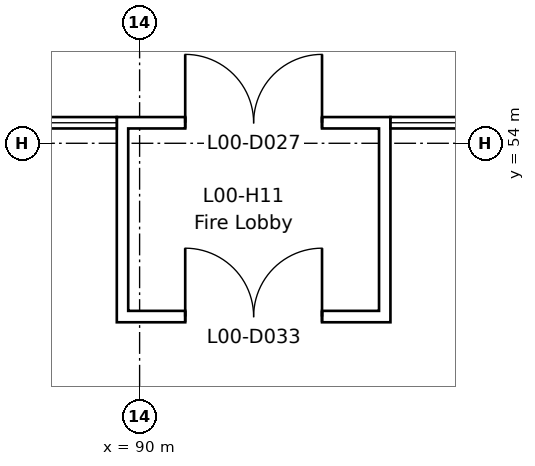
"""IFC4 building model, lengths in metres.
Left out: names, types, materials, properties, quantities, classifications, styles, units other than length and angle.
Written with IfcOpenShell. Run it as: python <this file> out.ifc"""

import sys

from ifc_helpers import new_model, si_unit, direction, frame, frame_2d, origin, place, context, subcontext, project, spatial, rectangle, extrude, element, fill, save


model = new_model("IFC4")
c1 = context("Model", 3, precision=1e-05, world=origin(), true_north=direction((0.0, 1.0)))
c2 = subcontext(c1, "Body", "Model", "MODEL_VIEW")
j1 = project(units=[si_unit("LENGTHUNIT", "METRE"), si_unit("PLANEANGLEUNIT", "RADIAN")], contexts=[c1])
p1 = place(None, origin())
s1 = spatial("IfcSite", under=j1, at=p1, CompositionType="ELEMENT")
p2 = place(p1, origin())
s2 = spatial("IfcBuilding", under=s1, at=p2, CompositionType="ELEMENT")
p3 = place(p2, origin())
s3 = spatial("IfcBuildingStorey", under=s2, at=p3, CompositionType="ELEMENT", Elevation=0.0)
p4 = place(p3, frame((89.7, 54.27, 0.0), z_axis=(0.0, 0.0, 1.0), x_axis=(1.0, 0.0, 0.0)))
e1 = element("IfcWall", 1, at=p4, inside=s3, PredefinedType="STANDARD", context=c2, shape_type="SweptSolid", body=[
    extrude(rectangle(XDim=3.6, YDim=0.15, at=frame_2d((1.8, 0.0))), origin(), (0.0, 0.0, 1.0), 4.8),
])
p5 = place(p4, frame((0.9, 0.0, 0.0)))
e2 = element("IfcOpeningElement", 2, at=p5, cuts=e1, PredefinedType="OPENING", context=c2, shape_type="SweptSolid", body=[
    extrude(rectangle(XDim=1.8, YDim=2.4, at=frame_2d((0.9, 1.2))), frame((0.0, 0.085, 0.0), z_axis=(0.0, -1.0, 0.0), x_axis=(1.0, 0.0, 0.0)), (0.0, 0.0, 1.0), 0.17),
])
for number, where, z_axis, x_axis in (
    (3, (89.775, 51.795, 0.0), (0.0, 0.0, 1.0), (0.0, 1.0, 0.0)),
    (4, (93.225, 51.795, 0.0), (0.0, 0.0, 1.0), (0.0, 1.0, 0.0)),
):
    element("IfcWall", number, at=place(p3, frame(where, z_axis=z_axis, x_axis=x_axis)), inside=s3, PredefinedType="STANDARD", context=c2, shape_type="SweptSolid", body=[
        extrude(rectangle(XDim=2.4, YDim=0.15, at=frame_2d((1.2, 0.0))), origin(), (0.0, 0.0, 1.0), 3.0),
    ])
p6 = place(p3, frame((89.7, 51.72, 0.0), z_axis=(0.0, 0.0, 1.0), x_axis=(1.0, 0.0, 0.0)))
e5 = element("IfcWall", 5, at=p6, inside=s3, PredefinedType="STANDARD", context=c2, shape_type="SweptSolid", body=[
    extrude(rectangle(XDim=3.6, YDim=0.15, at=frame_2d((1.8, 0.0))), origin(), (0.0, 0.0, 1.0), 3.0),
])
p7 = place(p6, frame((0.9, 0.0, 0.0)))
e6 = element("IfcOpeningElement", 6, at=p7, cuts=e5, PredefinedType="OPENING", context=c2, shape_type="SweptSolid", body=[
    extrude(rectangle(XDim=1.8, YDim=2.4, at=frame_2d((0.9, 1.2))), frame((0.0, 0.085, 0.0), z_axis=(0.0, -1.0, 0.0), x_axis=(1.0, 0.0, 0.0)), (0.0, 0.0, 1.0), 0.17),
])
p8 = place(p5, origin())
e7 = element("IfcDoor", 7, at=p8, inside=s3, OperationType="DOUBLE_DOOR_SINGLE_SWING", PredefinedType="DOOR", context=c2, shape_type="SweptSolid", body=[
    extrude(rectangle(XDim=1.8, YDim=2.4, at=frame_2d((0.9, 1.2))), frame((0.0, 0.025, 0.0), z_axis=(0.0, -1.0, 0.0), x_axis=(1.0, 0.0, 0.0)), (0.0, 0.0, 1.0), 0.05),
])
fill(e2, e7)
p9 = place(p7, origin())
e8 = element("IfcDoor", 8, at=p9, inside=s3, OperationType="DOUBLE_DOOR_SINGLE_SWING", PredefinedType="DOOR", context=c2, shape_type="SweptSolid", body=[
    extrude(rectangle(XDim=1.8, YDim=2.4, at=frame_2d((0.9, 1.2))), frame((0.0, 0.025, 0.0), z_axis=(0.0, -1.0, 0.0), x_axis=(1.0, 0.0, 0.0)), (0.0, 0.0, 1.0), 0.05),
])
fill(e6, e8)
save(model, sys.argv[1])
